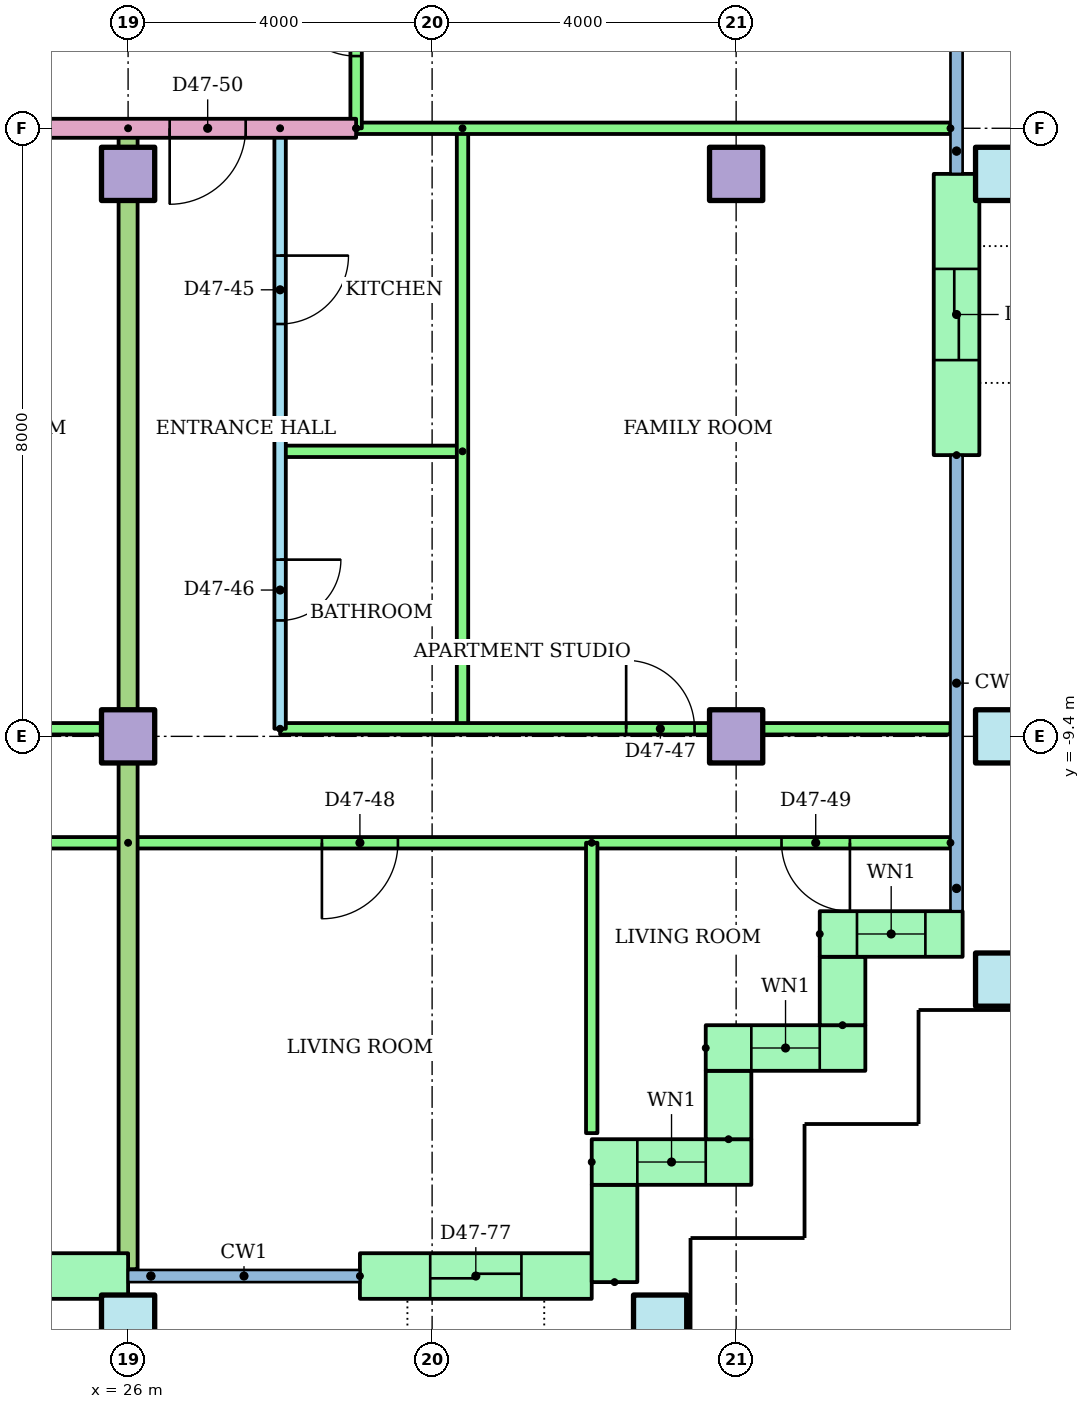
"""IFC4 building model, lengths in metres.
Left out: names, types, materials, properties, quantities, classifications, styles, units other than length and angle.
Written with IfcOpenShell. Run it as: python <this file> out.ifc"""

import sys

from ifc_helpers import new_model, si_unit, direction, frame, frame_2d, origin, origin_2d, place, context, subcontext, project, spatial, rectangle, hollow_rectangle, extrude, element, fill, save


model = new_model("IFC4")
c1 = context("Model", 3, precision=1e-05, world=origin(), true_north=direction((0.0, 1.0)))
c2 = subcontext(c1, "Body", "Model", "MODEL_VIEW")
j1 = project(units=[si_unit("LENGTHUNIT", "METRE"), si_unit("PLANEANGLEUNIT", "RADIAN")], contexts=[c1])
p1 = place(None, origin())
s1 = spatial("IfcSite", under=j1, at=p1, CompositionType="ELEMENT")
p2 = place(p1, origin())
s2 = spatial("IfcBuilding", under=s1, at=p2, CompositionType="ELEMENT")
p3 = place(p2, frame((0.0, 0.0, 181.3)))
s3 = spatial("IfcBuildingStorey", under=s2, at=p3, CompositionType="ELEMENT", Elevation=181.3)
for number, where in (
    (1, (26.0, -17.1, 0.0)),
    (2, (33.0, -17.1, 0.0)),
    (3, (37.5, -12.6, 0.0)),
):
    element("IfcColumn", number, at=place(p3, frame(where)), inside=s3, PredefinedType="COLUMN", context=c2, shape_type="SweptSolid", body=[
        extrude(hollow_rectangle(XDim=0.7, YDim=0.7, WallThickness=0.036, at=origin_2d()), origin(), (0.0, 0.0, 1.0), 3.2),
    ])
for number, where in (
    (4, (26.0, -9.4, 0.0)),
    (5, (34.0, -9.4, 0.0)),
):
    element("IfcColumn", number, at=place(p3, frame(where)), inside=s3, PredefinedType="COLUMN", context=c2, shape_type="SweptSolid", body=[
        extrude(rectangle(XDim=0.7, YDim=0.7, at=origin_2d()), origin(), (0.0, 0.0, 1.0), 3.2),
    ])
p4 = place(p3, frame((37.5, -9.4, 0.0)))
e6 = element("IfcColumn", 6, at=p4, inside=s3, PredefinedType="COLUMN", context=c2, shape_type="SweptSolid", body=[
    extrude(hollow_rectangle(XDim=0.7, YDim=0.7, WallThickness=0.036, at=origin_2d()), origin(), (0.0, 0.0, 1.0), 3.2),
])
for number, where in (
    (7, (26.0, -2.0, 0.0)),
    (8, (34.0, -2.0, 0.0)),
):
    element("IfcColumn", number, at=place(p3, frame(where)), inside=s3, PredefinedType="COLUMN", context=c2, shape_type="SweptSolid", body=[
        extrude(rectangle(XDim=0.7, YDim=0.7, at=origin_2d()), origin(), (0.0, 0.0, 1.0), 3.2),
    ])
p5 = place(p3, frame((37.5, -2.0, 0.0)))
e9 = element("IfcColumn", 9, at=p5, inside=s3, PredefinedType="COLUMN", context=c2, shape_type="SweptSolid", body=[
    extrude(hollow_rectangle(XDim=0.7, YDim=0.7, WallThickness=0.036, at=origin_2d()), origin(), (0.0, 0.0, 1.0), 3.2),
])
p6 = place(p3, frame((22.0, -16.5, 0.0)))
e10 = element("IfcWall", 10, at=p6, inside=s3, PredefinedType="STANDARD", context=c2, shape_type="SweptSolid", body=[
    extrude(rectangle(XDim=4.0, YDim=0.6, at=frame_2d((2.0, 0.0))), origin(), (0.0, 0.0, 1.0), 2.92),
])
p7 = place(p6, frame((1.4, 0.0, 0.0)))
e11 = element("IfcOpeningElement", 11, at=p7, cuts=e10, PredefinedType="OPENING", context=c2, shape_type="SweptSolid", body=[
    extrude(rectangle(XDim=1.2, YDim=2.1, at=frame_2d((0.6, 1.05))), frame((0.0, 0.31, 0.0), z_axis=(0.0, -1.0, 0.0), x_axis=(1.0, 0.0, 0.0)), (0.0, 0.0, 1.0), 0.62),
])
p8 = place(p3, frame((29.05, -16.5, 0.0)))
e12 = element("IfcWall", 12, at=p8, inside=s3, PredefinedType="STANDARD", context=c2, shape_type="SweptSolid", body=[
    extrude(rectangle(XDim=3.05, YDim=0.6, at=frame_2d((1.525, 0.0))), origin(), (0.0, 0.0, 1.0), 2.92),
])
p9 = place(p8, frame((0.925, 0.0, 0.0)))
e13 = element("IfcOpeningElement", 13, at=p9, cuts=e12, PredefinedType="OPENING", context=c2, shape_type="SweptSolid", body=[
    extrude(rectangle(XDim=1.2, YDim=2.1, at=frame_2d((0.6, 1.05))), frame((0.0, 0.31, 0.0), z_axis=(0.0, -1.0, 0.0), x_axis=(1.0, 0.0, 0.0)), (0.0, 0.0, 1.0), 0.62),
])
p10 = place(p3, frame((32.4, -16.58, 0.0), z_axis=(0.0, 0.0, 1.0), x_axis=(0.0, 1.0, 0.0)))
e14 = element("IfcWall", 14, at=p10, inside=s3, PredefinedType="STANDARD", context=c2, shape_type="SweptSolid", body=[
    extrude(rectangle(XDim=1.28, YDim=0.6, at=frame_2d((0.64, 0.0))), origin(), (0.0, 0.0, 1.0), 2.92),
])
p11 = place(p3, frame((32.1, -15.0, 0.0)))
e15 = element("IfcWall", 15, at=p11, inside=s3, PredefinedType="STANDARD", context=c2, shape_type="SweptSolid", body=[
    extrude(rectangle(XDim=2.1, YDim=0.6, at=frame_2d((1.05, 0.0))), origin(), (0.0, 0.0, 1.0), 2.92),
])
p12 = place(p11, frame((0.6, 0.0, 0.9)))
e16 = element("IfcOpeningElement", 16, at=p12, cuts=e15, PredefinedType="OPENING", context=c2, shape_type="SweptSolid", body=[
    extrude(rectangle(XDim=0.9, YDim=1.5, at=frame_2d((0.45, 0.75))), frame((0.0, 0.31, 0.0), z_axis=(0.0, -1.0, 0.0), x_axis=(1.0, 0.0, 0.0)), (0.0, 0.0, 1.0), 0.62),
])
p13 = place(p3, frame((33.9, -14.7, 0.0), z_axis=(0.0, 0.0, 1.0), x_axis=(0.0, 1.0, 0.0)))
e17 = element("IfcWall", 17, at=p13, inside=s3, PredefinedType="STANDARD", context=c2, shape_type="SweptSolid", body=[
    extrude(rectangle(XDim=0.9, YDim=0.6, at=frame_2d((0.45, 0.0))), origin(), (0.0, 0.0, 1.0), 2.92),
])
p14 = place(p3, frame((33.6, -13.5, 0.0)))
e18 = element("IfcWall", 18, at=p14, inside=s3, PredefinedType="STANDARD", context=c2, shape_type="SweptSolid", body=[
    extrude(rectangle(XDim=2.1, YDim=0.6, at=frame_2d((1.05, 0.0))), origin(), (0.0, 0.0, 1.0), 2.92),
])
p15 = place(p14, frame((0.6, 0.0, 0.9)))
e19 = element("IfcOpeningElement", 19, at=p15, cuts=e18, PredefinedType="OPENING", context=c2, shape_type="SweptSolid", body=[
    extrude(rectangle(XDim=0.9, YDim=1.5, at=frame_2d((0.45, 0.75))), frame((0.0, 0.31, 0.0), z_axis=(0.0, -1.0, 0.0), x_axis=(1.0, 0.0, 0.0)), (0.0, 0.0, 1.0), 0.62),
])
p16 = place(p3, frame((35.4, -13.2, 0.0), z_axis=(0.0, 0.0, 1.0), x_axis=(0.0, 1.0, 0.0)))
e20 = element("IfcWall", 20, at=p16, inside=s3, PredefinedType="STANDARD", context=c2, shape_type="SweptSolid", body=[
    extrude(rectangle(XDim=0.9, YDim=0.6, at=frame_2d((0.45, 0.0))), origin(), (0.0, 0.0, 1.0), 2.92),
])
p17 = place(p3, frame((35.1, -12.0, 0.0)))
e21 = element("IfcWall", 21, at=p17, inside=s3, PredefinedType="STANDARD", context=c2, shape_type="SweptSolid", body=[
    extrude(rectangle(XDim=1.88, YDim=0.6, at=frame_2d((0.94, 0.0))), origin(), (0.0, 0.0, 1.0), 2.92),
])
p18 = place(p17, frame((0.49, 0.0, 0.9)))
e22 = element("IfcOpeningElement", 22, at=p18, cuts=e21, PredefinedType="OPENING", context=c2, shape_type="SweptSolid", body=[
    extrude(rectangle(XDim=0.9, YDim=1.5, at=frame_2d((0.45, 0.75))), frame((0.0, 0.31, 0.0), z_axis=(0.0, -1.0, 0.0), x_axis=(1.0, 0.0, 0.0)), (0.0, 0.0, 1.0), 0.62),
])
p19 = place(p3, frame((36.9, -5.7, 0.0), z_axis=(0.0, 0.0, 1.0), x_axis=(0.0, 1.0, 0.0)))
e23 = element("IfcWall", 23, at=p19, inside=s3, PredefinedType="STANDARD", context=c2, shape_type="SweptSolid", body=[
    extrude(rectangle(XDim=3.7, YDim=0.6, at=frame_2d((1.85, 0.0))), origin(), (0.0, 0.0, 1.0), 2.92),
])
p20 = place(p19, frame((1.25, 0.0, 0.0)))
e24 = element("IfcOpeningElement", 24, at=p20, cuts=e23, PredefinedType="OPENING", context=c2, shape_type="SweptSolid", body=[
    extrude(rectangle(XDim=1.2, YDim=2.1, at=frame_2d((0.6, 1.05))), frame((0.0, 0.31, 0.0), z_axis=(0.0, -1.0, 0.0), x_axis=(1.0, 0.0, 0.0)), (0.0, 0.0, 1.0), 0.62),
])
p21 = place(p3, frame((20.0, -9.3, 0.0)))
e25 = element("IfcWall", 25, at=p21, inside=s3, PredefinedType="PARTITIONING", context=c2, shape_type="SweptSolid", body=[
    extrude(rectangle(XDim=6.0, YDim=0.15, at=frame_2d((3.0, 0.0))), origin(), (0.0, 0.0, 1.0), 2.4),
])
p22 = place(p21, frame((3.75, 0.0, 0.0)))
e26 = element("IfcOpeningElement", 26, at=p22, cuts=e25, PredefinedType="OPENING", context=c2, shape_type="SweptSolid", body=[
    extrude(rectangle(XDim=0.9, YDim=2.1, at=frame_2d((0.45, 1.05))), frame((0.0, 0.085, 0.0), z_axis=(0.0, -1.0, 0.0), x_axis=(1.0, 0.0, 0.0)), (0.0, 0.0, 1.0), 0.17),
])
p23 = place(p3, frame((26.0, -10.8, 0.0), z_axis=(0.0, 0.0, 1.0), x_axis=(-1.0, 0.0, 0.0)))
e27 = element("IfcWall", 27, at=p23, inside=s3, PredefinedType="PARTITIONING", context=c2, shape_type="SweptSolid", body=[
    extrude(rectangle(XDim=8.0, YDim=0.15, at=frame_2d((4.0, 0.0))), origin(), (0.0, 0.0, 1.0), 2.4),
])
p24 = place(p23, frame((5.55, 0.0, 0.0)))
e28 = element("IfcOpeningElement", 28, at=p24, cuts=e27, PredefinedType="OPENING", context=c2, shape_type="SweptSolid", body=[
    extrude(rectangle(XDim=0.9, YDim=2.1, at=frame_2d((0.45, 1.05))), frame((0.0, 0.085, 0.0), z_axis=(0.0, -1.0, 0.0), x_axis=(1.0, 0.0, 0.0)), (0.0, 0.0, 1.0), 0.17),
])
p25 = place(p23, frame((1.5, 0.0, 0.0)))
e29 = element("IfcOpeningElement", 29, at=p25, cuts=e27, PredefinedType="OPENING", context=c2, shape_type="SweptSolid", body=[
    extrude(rectangle(XDim=1.0, YDim=2.1, at=frame_2d((0.5, 1.05))), frame((0.0, 0.085, 0.0), z_axis=(0.0, -1.0, 0.0), x_axis=(1.0, 0.0, 0.0)), (0.0, 0.0, 1.0), 0.17),
])
p26 = place(p3, frame((28.0, -1.4, 0.0), z_axis=(0.0, 0.0, 1.0), x_axis=(0.0, -1.0, 0.0)))
e30 = element("IfcWall", 30, at=p26, inside=s3, PredefinedType="PARTITIONING", context=c2, shape_type="SweptSolid", body=[
    extrude(rectangle(XDim=7.9, YDim=0.15, at=frame_2d((3.95, 0.0))), origin(), (0.0, 0.0, 1.0), 2.4),
])
p27 = place(p26, frame((1.675, 0.0, 0.0)))
e31 = element("IfcOpeningElement", 31, at=p27, cuts=e30, PredefinedType="OPENING", context=c2, shape_type="SweptSolid", body=[
    extrude(rectangle(XDim=0.9, YDim=2.1, at=frame_2d((0.45, 1.05))), frame((0.0, 0.085, 0.0), z_axis=(0.0, -1.0, 0.0), x_axis=(1.0, 0.0, 0.0)), (0.0, 0.0, 1.0), 0.17),
])
p28 = place(p26, frame((5.675, 0.0, 0.0)))
e32 = element("IfcOpeningElement", 32, at=p28, cuts=e30, PredefinedType="OPENING", context=c2, shape_type="SweptSolid", body=[
    extrude(rectangle(XDim=0.8, YDim=2.1, at=frame_2d((0.4, 1.05))), frame((0.0, 0.085, 0.0), z_axis=(0.0, -1.0, 0.0), x_axis=(1.0, 0.0, 0.0)), (0.0, 0.0, 1.0), 0.17),
])
p29 = place(p3, frame((30.4, -5.65, 0.0), z_axis=(0.0, 0.0, 1.0), x_axis=(-1.0, 0.0, 0.0)))
e33 = element("IfcWall", 33, at=p29, inside=s3, PredefinedType="PARTITIONING", context=c2, shape_type="SweptSolid", body=[
    extrude(rectangle(XDim=2.4, YDim=0.15, at=frame_2d((1.2, 0.0))), origin(), (0.0, 0.0, 1.0), 2.4),
])
p30 = place(p3, frame((30.4, -1.4, 0.0), z_axis=(0.0, 0.0, 1.0), x_axis=(0.0, -1.0, 0.0)))
e34 = element("IfcWall", 34, at=p30, inside=s3, PredefinedType="PARTITIONING", context=c2, shape_type="SweptSolid", body=[
    extrude(rectangle(XDim=7.9, YDim=0.15, at=frame_2d((3.95, 0.0))), origin(), (0.0, 0.0, 1.0), 2.4),
])
p31 = place(p3, frame((28.0, -9.3, 0.0)))
e35 = element("IfcWall", 35, at=p31, inside=s3, PredefinedType="PARTITIONING", context=c2, shape_type="SweptSolid", body=[
    extrude(rectangle(XDim=8.82, YDim=0.15, at=frame_2d((4.41, 0.0))), origin(), (0.0, 0.0, 1.0), 2.4),
])
p32 = place(p31, frame((4.553, 0.0, 0.0)))
e36 = element("IfcOpeningElement", 36, at=p32, cuts=e35, PredefinedType="OPENING", context=c2, shape_type="SweptSolid", body=[
    extrude(rectangle(XDim=0.9, YDim=2.1, at=frame_2d((0.45, 1.05))), frame((0.0, 0.085, 0.0), z_axis=(0.0, -1.0, 0.0), x_axis=(1.0, 0.0, 0.0)), (0.0, 0.0, 1.0), 0.17),
])
p33 = place(p3, frame((36.82, -10.8, 0.0), z_axis=(0.0, 0.0, 1.0), x_axis=(-1.0, 0.0, 0.0)))
e37 = element("IfcWall", 37, at=p33, inside=s3, PredefinedType="PARTITIONING", context=c2, shape_type="SweptSolid", body=[
    extrude(rectangle(XDim=10.82, YDim=0.15, at=frame_2d((5.41, 0.0))), origin(), (0.0, 0.0, 1.0), 2.4),
])
p34 = place(p33, frame((7.27, 0.0, 0.0)))
e38 = element("IfcOpeningElement", 38, at=p34, cuts=e37, PredefinedType="OPENING", context=c2, shape_type="SweptSolid", body=[
    extrude(rectangle(XDim=1.0, YDim=2.1, at=frame_2d((0.5, 1.05))), frame((0.0, 0.085, 0.0), z_axis=(0.0, -1.0, 0.0), x_axis=(1.0, 0.0, 0.0)), (0.0, 0.0, 1.0), 0.17),
])
p35 = place(p33, frame((1.323, 0.0, 0.0)))
e39 = element("IfcOpeningElement", 39, at=p35, cuts=e37, PredefinedType="OPENING", context=c2, shape_type="SweptSolid", body=[
    extrude(rectangle(XDim=0.9, YDim=2.1, at=frame_2d((0.45, 1.05))), frame((0.0, 0.085, 0.0), z_axis=(0.0, -1.0, 0.0), x_axis=(1.0, 0.0, 0.0)), (0.0, 0.0, 1.0), 0.17),
])
p36 = place(p3, frame((32.1, -10.8, 0.0), z_axis=(0.0, 0.0, 1.0), x_axis=(0.0, -1.0, 0.0)))
e40 = element("IfcWall", 40, at=p36, inside=s3, PredefinedType="PARTITIONING", context=c2, shape_type="SweptSolid", body=[
    extrude(rectangle(XDim=3.82, YDim=0.15, at=frame_2d((1.91, 0.0))), origin(), (0.0, 0.0, 1.0), 2.4),
])
p37 = place(p3, frame((26.0, -1.4, 0.0), z_axis=(0.0, 0.0, 1.0), x_axis=(0.0, -1.0, 0.0)))
e41 = element("IfcWall", 41, at=p37, inside=s3, PredefinedType="PARTITIONING", context=c2, shape_type="SweptSolid", body=[
    extrude(rectangle(XDim=15.01, YDim=0.25, at=frame_2d((7.505, 0.0))), origin(), (0.0, 0.0, 1.0), 2.4),
])
p38 = place(p3, frame((29.0, -1.4, 0.0), z_axis=(0.0, 0.0, 1.0), x_axis=(-1.0, 0.0, 0.0)))
e42 = element("IfcWall", 42, at=p38, inside=s3, PredefinedType="PARTITIONING", context=c2, shape_type="SweptSolid", body=[
    extrude(rectangle(XDim=15.0, YDim=0.25, at=frame_2d((7.5, 0.0))), origin(), (0.0, 0.0, 1.0), 2.4),
])
p39 = place(p38, frame((9.453, 0.0, 0.0)))
e43 = element("IfcOpeningElement", 43, at=p39, cuts=e42, PredefinedType="OPENING", context=c2, shape_type="SweptSolid", body=[
    extrude(rectangle(XDim=1.0, YDim=2.1, at=frame_2d((0.5, 1.05))), frame((0.0, 0.135, 0.0), z_axis=(0.0, -1.0, 0.0), x_axis=(1.0, 0.0, 0.0)), (0.0, 0.0, 1.0), 0.27),
])
p40 = place(p38, frame((1.453, 0.0, 0.0)))
e44 = element("IfcOpeningElement", 44, at=p40, cuts=e42, PredefinedType="OPENING", context=c2, shape_type="SweptSolid", body=[
    extrude(rectangle(XDim=1.0, YDim=2.1, at=frame_2d((0.5, 1.05))), frame((0.0, 0.135, 0.0), z_axis=(0.0, -1.0, 0.0), x_axis=(1.0, 0.0, 0.0)), (0.0, 0.0, 1.0), 0.27),
])
p41 = place(p3, frame((36.82, -1.4, 0.0), z_axis=(0.0, 0.0, 1.0), x_axis=(-1.0, 0.0, 0.0)))
e45 = element("IfcWall", 45, at=p41, inside=s3, PredefinedType="PARTITIONING", context=c2, shape_type="SweptSolid", body=[
    extrude(rectangle(XDim=7.82, YDim=0.15, at=frame_2d((3.91, 0.0))), origin(), (0.0, 0.0, 1.0), 2.4),
])
p42 = place(p3, frame((29.0, -1.4, 0.0), z_axis=(0.0, 0.0, 1.0), x_axis=(0.0, 1.0, 0.0)))
e46 = element("IfcWall", 46, at=p42, inside=s3, PredefinedType="PARTITIONING", context=c2, shape_type="SweptSolid", body=[
    extrude(rectangle(XDim=2.8, YDim=0.15, at=frame_2d((1.4, 0.0))), origin(), (0.0, 0.0, 1.0), 2.4),
])
p43 = place(p42, frame((0.95, 0.0, 0.0)))
e47 = element("IfcOpeningElement", 47, at=p43, cuts=e46, PredefinedType="OPENING", context=c2, shape_type="SweptSolid", body=[
    extrude(rectangle(XDim=0.9, YDim=2.1, at=frame_2d((0.45, 1.05))), frame((0.0, 0.085, 0.0), z_axis=(0.0, -1.0, 0.0), x_axis=(1.0, 0.0, 0.0)), (0.0, 0.0, 1.0), 0.17),
])
p44 = place(p12, origin())
e48 = element("IfcWindow", 48, at=p44, inside=s3, PartitioningType="SINGLE_PANEL", PredefinedType="WINDOW", context=c2, shape_type="SweptSolid", body=[
    extrude(rectangle(XDim=0.9, YDim=1.5, at=frame_2d((0.45, 0.75))), frame((0.0, 0.03, 0.0), z_axis=(0.0, -1.0, 0.0), x_axis=(1.0, 0.0, 0.0)), (0.0, 0.0, 1.0), 0.06),
])
fill(e16, e48)
p45 = place(p15, origin())
e49 = element("IfcWindow", 49, at=p45, inside=s3, PartitioningType="SINGLE_PANEL", PredefinedType="WINDOW", context=c2, shape_type="SweptSolid", body=[
    extrude(rectangle(XDim=0.9, YDim=1.5, at=frame_2d((0.45, 0.75))), frame((0.0, 0.03, 0.0), z_axis=(0.0, -1.0, 0.0), x_axis=(1.0, 0.0, 0.0)), (0.0, 0.0, 1.0), 0.06),
])
fill(e19, e49)
p46 = place(p18, origin())
e50 = element("IfcWindow", 50, at=p46, inside=s3, PartitioningType="SINGLE_PANEL", PredefinedType="WINDOW", context=c2, shape_type="SweptSolid", body=[
    extrude(rectangle(XDim=0.9, YDim=1.5, at=frame_2d((0.45, 0.75))), frame((0.0, 0.03, 0.0), z_axis=(0.0, -1.0, 0.0), x_axis=(1.0, 0.0, 0.0)), (0.0, 0.0, 1.0), 0.06),
])
fill(e22, e50)
p47 = place(p27, origin())
e51 = element("IfcDoor", 51, at=p47, inside=s3, OperationType="SINGLE_SWING_LEFT", PredefinedType="DOOR", context=c2, shape_type="SweptSolid", body=[
    extrude(rectangle(XDim=0.9, YDim=2.1, at=frame_2d((0.45, 1.05))), frame((0.0, 0.025, 0.0), z_axis=(0.0, -1.0, 0.0), x_axis=(1.0, 0.0, 0.0)), (0.0, 0.0, 1.0), 0.05),
])
fill(e31, e51)
p48 = place(p28, origin())
e52 = element("IfcDoor", 52, at=p48, inside=s3, OperationType="SINGLE_SWING_LEFT", PredefinedType="DOOR", context=c2, shape_type="SweptSolid", body=[
    extrude(rectangle(XDim=0.8, YDim=2.1, at=frame_2d((0.4, 1.05))), frame((0.0, 0.025, 0.0), z_axis=(0.0, -1.0, 0.0), x_axis=(1.0, 0.0, 0.0)), (0.0, 0.0, 1.0), 0.05),
])
fill(e32, e52)
p49 = place(p32, origin())
e53 = element("IfcDoor", 53, at=p49, inside=s3, OperationType="SINGLE_SWING_LEFT", PredefinedType="DOOR", context=c2, shape_type="SweptSolid", body=[
    extrude(rectangle(XDim=0.9, YDim=2.1, at=frame_2d((0.45, 1.05))), frame((0.0, 0.025, 0.0), z_axis=(0.0, -1.0, 0.0), x_axis=(1.0, 0.0, 0.0)), (0.0, 0.0, 1.0), 0.05),
])
fill(e36, e53)
p50 = place(p34, origin())
e54 = element("IfcDoor", 54, at=p50, inside=s3, OperationType="SINGLE_SWING_RIGHT", PredefinedType="DOOR", context=c2, shape_type="SweptSolid", body=[
    extrude(rectangle(XDim=1.0, YDim=2.1, at=frame_2d((0.5, 1.05))), frame((0.0, 0.025, 0.0), z_axis=(0.0, -1.0, 0.0), x_axis=(1.0, 0.0, 0.0)), (0.0, 0.0, 1.0), 0.05),
])
fill(e38, e54)
p51 = place(p35, origin())
e55 = element("IfcDoor", 55, at=p51, inside=s3, OperationType="SINGLE_SWING_LEFT", PredefinedType="DOOR", context=c2, shape_type="SweptSolid", body=[
    extrude(rectangle(XDim=0.9, YDim=2.1, at=frame_2d((0.45, 1.05))), frame((0.0, 0.025, 0.0), z_axis=(0.0, -1.0, 0.0), x_axis=(1.0, 0.0, 0.0)), (0.0, 0.0, 1.0), 0.05),
])
fill(e39, e55)
p52 = place(p40, origin())
e56 = element("IfcDoor", 56, at=p52, inside=s3, OperationType="SINGLE_SWING_RIGHT", PredefinedType="DOOR", context=c2, shape_type="SweptSolid", body=[
    extrude(rectangle(XDim=1.0, YDim=2.1, at=frame_2d((0.5, 1.05))), frame((0.0, 0.025, 0.0), z_axis=(0.0, -1.0, 0.0), x_axis=(1.0, 0.0, 0.0)), (0.0, 0.0, 1.0), 0.05),
])
fill(e44, e56)
p53 = place(p43, origin())
e57 = element("IfcDoor", 57, at=p53, inside=s3, OperationType="SINGLE_SWING_RIGHT", PredefinedType="DOOR", context=c2, shape_type="SweptSolid", body=[
    extrude(rectangle(XDim=0.9, YDim=2.1, at=frame_2d((0.45, 1.05))), frame((0.0, 0.025, 0.0), z_axis=(0.0, -1.0, 0.0), x_axis=(1.0, 0.0, 0.0)), (0.0, 0.0, 1.0), 0.05),
])
fill(e47, e57)
p54 = place(p9, origin())
e58 = element("IfcDoor", 58, at=p54, inside=s3, OperationType="SLIDING_TO_LEFT", PredefinedType="DOOR", context=c2, shape_type="SweptSolid", body=[
    extrude(rectangle(XDim=1.2, YDim=2.1, at=frame_2d((0.6, 1.05))), frame((0.0, 0.025, 0.0), z_axis=(0.0, -1.0, 0.0), x_axis=(1.0, 0.0, 0.0)), (0.0, 0.0, 1.0), 0.05),
])
fill(e13, e58)
p55 = place(p20, origin())
e59 = element("IfcDoor", 59, at=p55, inside=s3, OperationType="SLIDING_TO_LEFT", PredefinedType="DOOR", context=c2, shape_type="SweptSolid", body=[
    extrude(rectangle(XDim=1.2, YDim=2.1, at=frame_2d((0.6, 1.05))), frame((0.0, 0.025, 0.0), z_axis=(0.0, -1.0, 0.0), x_axis=(1.0, 0.0, 0.0)), (0.0, 0.0, 1.0), 0.05),
])
fill(e24, e59)
save(model, sys.argv[1])
